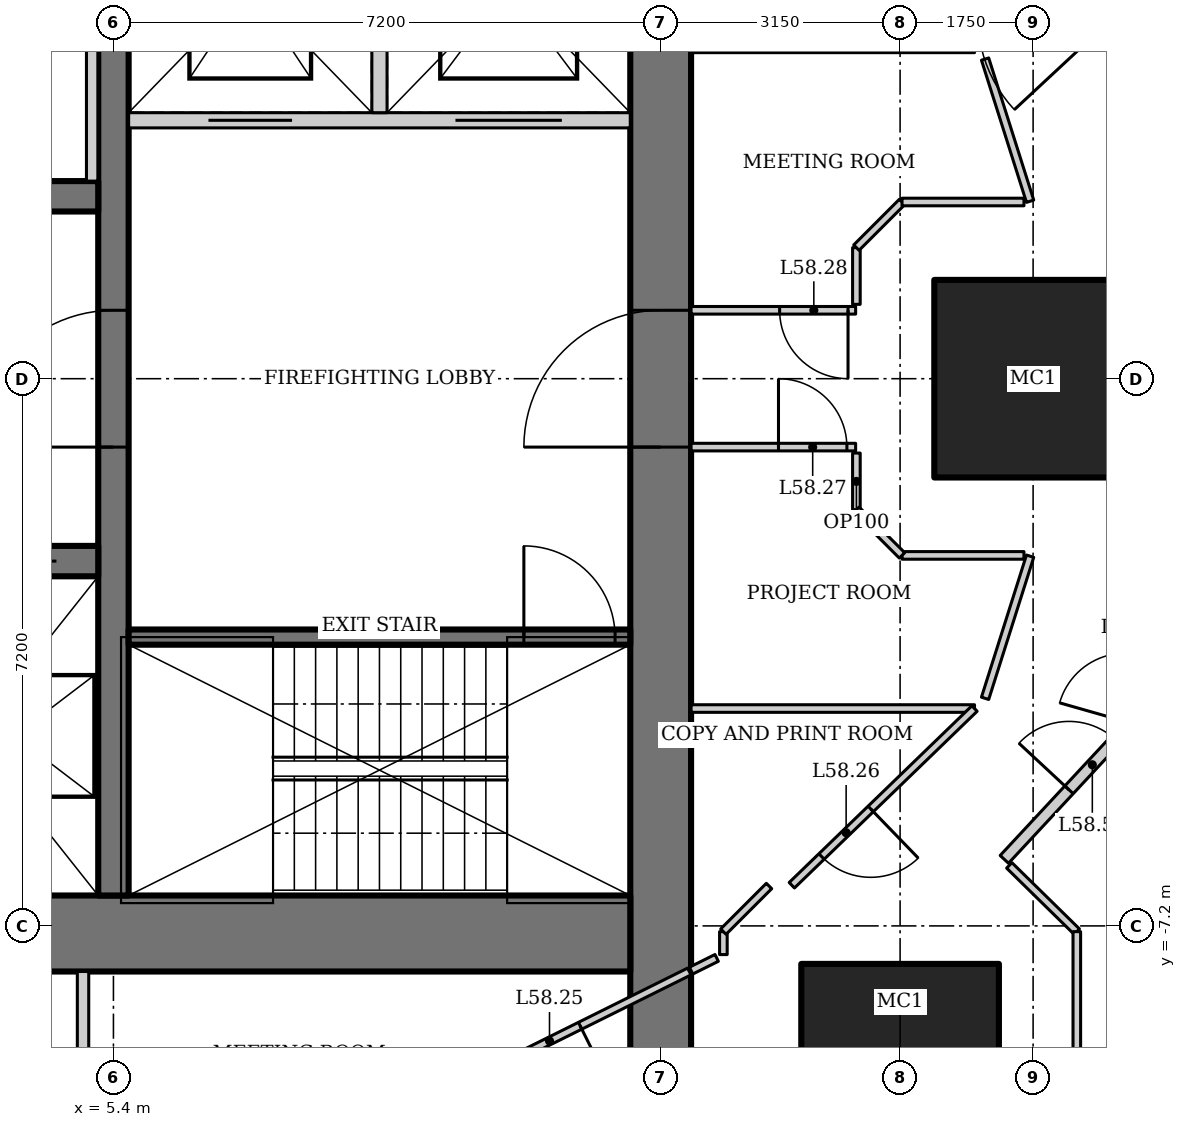
"""IFC4 building model, lengths in metres.
Left out: names, types, materials, properties, quantities, classifications, styles, units other than length and angle.
Written with IfcOpenShell. Run it as: python <this file> out.ifc"""

import sys

from ifc_helpers import new_model, si_unit, direction, frame, frame_2d, origin, origin_2d, place, context, subcontext, project, spatial, rectangle, hollow_rectangle, extrude, element, fill, save


model = new_model("IFC4")
c1 = context("Model", 3, precision=1e-05, world=origin(), true_north=direction((0.0, 1.0)))
c2 = subcontext(c1, "Body", "Model", "MODEL_VIEW")
j1 = project(units=[si_unit("LENGTHUNIT", "METRE"), si_unit("PLANEANGLEUNIT", "RADIAN")], contexts=[c1])
p1 = place(None, origin())
s1 = spatial("IfcSite", under=j1, at=p1, CompositionType="ELEMENT")
p2 = place(p1, origin())
s2 = spatial("IfcBuilding", under=s1, at=p2, CompositionType="ELEMENT")
p3 = place(p2, frame((0.0, 0.0, 249.4)))
s3 = spatial("IfcBuildingStorey", under=s2, at=p3, CompositionType="ELEMENT", Elevation=249.4)
for number, where, z_axis, x_axis in (
    (1, (17.5, 0.0, 0.0), (0.0, 0.0, 1.0), (1.0, 0.0, 0.0)),
    (2, (15.75, -9.0, 0.0), (0.0, 0.0, 1.0), (1.0, 0.0, 0.0)),
):
    element("IfcColumn", number, at=place(p3, frame(where, z_axis=z_axis, x_axis=x_axis)), inside=s3, PredefinedType="COLUMN", context=c2, shape_type="SweptSolid", body=[
        extrude(hollow_rectangle(XDim=2.6, YDim=2.6, WallThickness=0.13, at=origin_2d()), origin(), (0.0, 0.0, 1.0), 4.2),
    ])
p4 = place(p3, frame((12.6, -11.0, 0.0), z_axis=(0.0, 0.0, 1.0), x_axis=(0.0, 1.0, 0.0)))
e3 = element("IfcWall", 3, at=p4, inside=s3, PredefinedType="SHEAR", context=c2, shape_type="SweptSolid", body=[
    extrude(rectangle(XDim=22.0, YDim=0.8, at=frame_2d((11.0, 0.0))), origin(), (0.0, 0.0, 1.0), 4.2),
])
p5 = place(p4, frame((10.1, 0.0, 0.0)))
e4 = element("IfcOpeningElement", 4, at=p5, cuts=e3, PredefinedType="OPENING", context=c2, shape_type="SweptSolid", body=[
    extrude(rectangle(XDim=1.8, YDim=2.1, at=frame_2d((0.9, 1.05))), frame((0.0, 0.41, 0.0), z_axis=(0.0, -1.0, 0.0), x_axis=(1.0, 0.0, 0.0)), (0.0, 0.0, 1.0), 0.82),
])
p6 = place(p3, frame((-12.2, -7.3, 0.0), z_axis=(0.0, 0.0, 1.0), x_axis=(1.0, 0.0, 0.0)))
e5 = element("IfcWall", 5, at=p6, inside=s3, PredefinedType="SHEAR", context=c2, shape_type="SweptSolid", body=[
    extrude(rectangle(XDim=24.4, YDim=1.0, at=frame_2d((12.2, 0.0))), origin(), (0.0, 0.0, 1.0), 4.2),
])
p7 = place(p3, frame((5.4, -6.8, 0.0), z_axis=(0.0, 0.0, 1.0), x_axis=(0.0, 1.0, 0.0)))
e6 = element("IfcWall", 6, at=p7, inside=s3, PredefinedType="SHEAR", context=c2, shape_type="SweptSolid", body=[
    extrude(rectangle(XDim=14.6, YDim=0.4, at=frame_2d((7.3, 0.0))), origin(), (0.0, 0.0, 1.0), 4.2),
])
p8 = place(p7, frame((5.9, 0.0, 0.0)))
e7 = element("IfcOpeningElement", 7, at=p8, cuts=e6, PredefinedType="OPENING", context=c2, shape_type="SweptSolid", body=[
    extrude(rectangle(XDim=1.8, YDim=2.1, at=frame_2d((0.9, 1.05))), frame((0.0, 0.21, 0.0), z_axis=(0.0, -1.0, 0.0), x_axis=(1.0, 0.0, 0.0)), (0.0, 0.0, 1.0), 0.42),
])
p9 = place(p3, frame((-5.2, -2.4, 0.0), z_axis=(0.0, 0.0, 1.0), x_axis=(1.0, 0.0, 0.0)))
e8 = element("IfcWall", 8, at=p9, inside=s3, PredefinedType="SHEAR", context=c2, shape_type="SweptSolid", body=[
    extrude(rectangle(XDim=10.4, YDim=0.4, at=frame_2d((5.2, 0.0))), origin(), (0.0, 0.0, 1.0), 4.2),
])
p10 = place(p9, frame((1.683, 0.0, 0.0)))
e9 = element("IfcOpeningElement", 9, at=p10, cuts=e8, PredefinedType="OPENING", context=c2, shape_type="SweptSolid", body=[
    extrude(rectangle(XDim=1.1, YDim=2.2, at=frame_2d((0.55, 1.1))), frame((0.0, 0.21, 0.0), z_axis=(0.0, -1.0, 0.0), x_axis=(1.0, 0.0, 0.0)), (0.0, 0.0, 1.0), 0.42),
])
p11 = place(p9, frame((5.217, 0.0, 0.0)))
e10 = element("IfcOpeningElement", 10, at=p11, cuts=e8, PredefinedType="OPENING", context=c2, shape_type="SweptSolid", body=[
    extrude(rectangle(XDim=1.1, YDim=2.2, at=frame_2d((0.55, 1.1))), frame((0.0, 0.21, 0.0), z_axis=(0.0, -1.0, 0.0), x_axis=(1.0, 0.0, 0.0)), (0.0, 0.0, 1.0), 0.42),
])
p12 = place(p9, frame((8.75, 0.0, 0.0)))
e11 = element("IfcOpeningElement", 11, at=p12, cuts=e8, PredefinedType="OPENING", context=c2, shape_type="SweptSolid", body=[
    extrude(rectangle(XDim=1.1, YDim=2.2, at=frame_2d((0.55, 1.1))), frame((0.0, 0.21, 0.0), z_axis=(0.0, -1.0, 0.0), x_axis=(1.0, 0.0, 0.0)), (0.0, 0.0, 1.0), 0.42),
])
p13 = place(p3, frame((5.2, 2.4, 0.0), z_axis=(0.0, 0.0, 1.0), x_axis=(-1.0, 0.0, 0.0)))
e12 = element("IfcWall", 12, at=p13, inside=s3, PredefinedType="SHEAR", context=c2, shape_type="SweptSolid", body=[
    extrude(rectangle(XDim=10.4, YDim=0.4, at=frame_2d((5.2, 0.0))), origin(), (0.0, 0.0, 1.0), 4.2),
])
p14 = place(p3, frame((5.6, -3.4, 0.0), z_axis=(0.0, 0.0, 1.0), x_axis=(1.0, 0.0, 0.0)))
e13 = element("IfcWall", 13, at=p14, inside=s3, PredefinedType="SHEAR", context=c2, shape_type="SweptSolid", body=[
    extrude(rectangle(XDim=6.6, YDim=0.2, at=frame_2d((3.3, 0.0))), origin(), (0.0, 0.0, 1.0), 4.2),
])
p15 = place(p14, frame((5.2, 0.0, 0.0)))
e14 = element("IfcOpeningElement", 14, at=p15, cuts=e13, PredefinedType="OPENING", context=c2, shape_type="SweptSolid", body=[
    extrude(rectangle(XDim=1.2, YDim=2.1, at=frame_2d((0.6, 1.05))), frame((0.0, 0.11, 0.0), z_axis=(0.0, -1.0, 0.0), x_axis=(1.0, 0.0, 0.0)), (0.0, 0.0, 1.0), 0.22),
])
p16 = place(p3, frame((12.2, 3.4, 0.0), z_axis=(0.0, 0.0, 1.0), x_axis=(-1.0, 0.0, 0.0)))
e15 = element("IfcWall", 15, at=p16, inside=s3, PredefinedType="SOLIDWALL", context=c2, shape_type="SweptSolid", body=[
    extrude(rectangle(XDim=6.6, YDim=0.2, at=frame_2d((3.3, 0.0))), origin(), (0.0, 0.0, 1.0), 4.2),
])
p17 = place(p16, frame((4.45, 0.0, 0.0)))
e16 = element("IfcOpeningElement", 16, at=p17, cuts=e15, PredefinedType="OPENING", context=c2, shape_type="SweptSolid", body=[
    extrude(rectangle(XDim=1.1, YDim=2.2, at=frame_2d((0.55, 1.1))), frame((0.0, 0.11, 0.0), z_axis=(0.0, -1.0, 0.0), x_axis=(1.0, 0.0, 0.0)), (0.0, 0.0, 1.0), 0.22),
])
p18 = place(p16, frame((0.9, 0.0, 0.0)))
e17 = element("IfcOpeningElement", 17, at=p18, cuts=e15, PredefinedType="OPENING", context=c2, shape_type="SweptSolid", body=[
    extrude(rectangle(XDim=1.4, YDim=2.2, at=frame_2d((0.7, 1.1))), frame((0.0, 0.11, 0.0), z_axis=(0.0, -1.0, 0.0), x_axis=(1.0, 0.0, 0.0)), (0.0, 0.0, 1.0), 0.22),
])
p19 = place(p3, frame((8.9, 3.5, 0.0), z_axis=(0.0, 0.0, 1.0), x_axis=(0.0, 1.0, 0.0)))
e18 = element("IfcWall", 18, at=p19, inside=s3, PredefinedType="SOLIDWALL", context=c2, shape_type="SweptSolid", body=[
    extrude(rectangle(XDim=3.3, YDim=0.2, at=frame_2d((1.65, 0.0))), origin(), (0.0, 0.0, 1.0), 4.2),
])
p20 = place(p3, frame((5.12, 2.6, 0.0), z_axis=(0.0, 0.0, 1.0), x_axis=(0.0, 1.0, 0.0)))
e19 = element("IfcWall", 19, at=p20, inside=s3, PredefinedType="SOLIDWALL", context=c2, shape_type="SweptSolid", body=[
    extrude(rectangle(XDim=4.4, YDim=0.15, at=frame_2d((2.2, 0.0))), origin(), (0.0, 0.0, 1.0), 4.05),
])
p21 = place(p3, frame((5.0, -7.8, 0.0), z_axis=(0.0, 0.0, 1.0), x_axis=(0.0, -1.0, 0.0)))
e20 = element("IfcWall", 20, at=p21, inside=s3, PredefinedType="SOLIDWALL", context=c2, shape_type="SweptSolid", body=[
    extrude(rectangle(XDim=3.187, YDim=0.15, at=frame_2d((1.594, 0.0))), origin(), (0.0, 0.0, 1.0), 4.05),
])
p22 = place(p3, frame((12.977, -7.8, 0.0), z_axis=(0.0, 0.0, 1.0), x_axis=(-0.895529831139, -0.445001484874, 0.0)))
e21 = element("IfcWall", 21, at=p22, inside=s3, PredefinedType="PARTITIONING", context=c2, shape_type="SweptSolid", body=[
    extrude(rectangle(XDim=4.108, YDim=0.1, at=frame_2d((2.054, 0.0))), origin(), (0.0, 0.0, 1.0), 4.05),
])
p23 = place(p22, frame((1.604, 0.0, 0.0)))
e22 = element("IfcOpeningElement", 22, at=p23, cuts=e21, PredefinedType="OPENING", context=c2, shape_type="SweptSolid", body=[
    extrude(rectangle(XDim=0.9, YDim=2.1, at=frame_2d((0.45, 1.05))), frame((0.0, 0.06, 0.0), z_axis=(0.0, -1.0, 0.0), x_axis=(1.0, 0.0, 0.0)), (0.0, 0.0, 1.0), 0.12),
])
p24 = place(p3, frame((13.337, -7.621, 0.0), z_axis=(0.0, 0.0, 1.0), x_axis=(-0.895721570004, -0.444615416995, 0.0)))
e23 = element("IfcWall", 23, at=p24, inside=s3, PredefinedType="PARTITIONING", context=c2, shape_type="SweptSolid", body=[
    extrude(rectangle(XDim=0.376, YDim=0.1, at=frame_2d((0.188, 0.0))), origin(), (0.0, 0.0, 1.0), 4.05),
])
for number, where, z_axis, x_axis in (
    (24, (13.0, -4.34, 0.0), (0.0, 0.0, 1.0), (1.0, 0.0, 0.0)),
    (25, (13.0, 4.34, 0.0), (0.0, 0.0, 1.0), (1.0, 0.0, 0.0)),
):
    element("IfcWall", number, at=place(p3, frame(where, z_axis=z_axis, x_axis=x_axis)), inside=s3, PredefinedType="PARTITIONING", context=c2, shape_type="SweptSolid", body=[
        extrude(rectangle(XDim=3.729, YDim=0.1, at=frame_2d((1.865, 0.0))), origin(), (0.0, 0.0, 1.0), 4.05),
    ])
p25 = place(p3, frame((17.121, -6.325, 0.0), z_axis=(0.0, 0.0, 1.0), x_axis=(0.680985069419, 0.732297299755, 0.0)))
e26 = element("IfcWall", 26, at=p25, inside=s3, PredefinedType="PARTITIONING", context=c2, shape_type="SweptSolid", body=[
    extrude(rectangle(XDim=2.279, YDim=0.15, at=frame_2d((1.14, 0.0))), origin(), (0.0, 0.0, 1.0), 4.05),
])
p26 = place(p25, frame((1.25, 0.0, 0.0)))
e27 = element("IfcOpeningElement", 27, at=p26, cuts=e26, PredefinedType="OPENING", context=c2, shape_type="SweptSolid", body=[
    extrude(rectangle(XDim=0.9, YDim=2.1, at=frame_2d((0.45, 1.05))), frame((0.0, 0.085, 0.0), z_axis=(0.0, -1.0, 0.0), x_axis=(1.0, 0.0, 0.0)), (0.0, 0.0, 1.0), 0.17),
])
p27 = place(p3, frame((16.729, -4.34, 0.0), z_axis=(0.0, 0.0, 1.0), x_axis=(-0.718798647558, -0.695218314107, 0.0)))
e28 = element("IfcWall", 28, at=p27, inside=s3, PredefinedType="PARTITIONING", context=c2, shape_type="SweptSolid", body=[
    extrude(rectangle(XDim=3.344, YDim=0.1, at=frame_2d((1.672, 0.0))), origin(), (0.0, 0.0, 1.0), 4.05),
])
p28 = place(p27, frame((1.9, 0.0, 0.0)))
e29 = element("IfcOpeningElement", 29, at=p28, cuts=e28, PredefinedType="OPENING", context=c2, shape_type="SweptSolid", body=[
    extrude(rectangle(XDim=0.9, YDim=2.1, at=frame_2d((0.45, 1.05))), frame((0.0, 0.06, 0.0), z_axis=(0.0, -1.0, 0.0), x_axis=(1.0, 0.0, 0.0)), (0.0, 0.0, 1.0), 0.12),
])
p29 = place(p3, frame((13.425, -7.578, 0.0), z_axis=(0.0, 0.0, 1.0), x_axis=(0.0, 1.0, 0.0)))
e30 = element("IfcWall", 30, at=p29, inside=s3, PredefinedType="PARTITIONING", context=c2, shape_type="SweptSolid", body=[
    extrude(rectangle(XDim=0.302, YDim=0.1, at=frame_2d((0.151, 0.0))), origin(), (0.0, 0.0, 1.0), 4.05),
])
p30 = place(p3, frame((13.425, -7.275, 0.0), z_axis=(0.0, 0.0, 1.0), x_axis=(0.707106781187, 0.707106781187, 0.0)))
e31 = element("IfcWall", 31, at=p30, inside=s3, PredefinedType="PARTITIONING", context=c2, shape_type="SweptSolid", body=[
    extrude(rectangle(XDim=0.849, YDim=0.1, at=frame_2d((0.425, 0.0))), origin(), (0.0, 0.0, 1.0), 4.05),
])
p31 = place(p3, frame((17.187, -6.404, 0.0), z_axis=(0.0, 0.0, 1.0), x_axis=(0.713842064016, -0.700306723973, 0.0)))
e32 = element("IfcWall", 32, at=p31, inside=s3, PredefinedType="PARTITIONING", context=c2, shape_type="SweptSolid", body=[
    extrude(rectangle(XDim=1.245, YDim=0.1, at=frame_2d((0.622, 0.0))), origin(), (0.0, 0.0, 1.0), 4.05),
])
p32 = place(p3, frame((18.075, -7.275, 0.0), z_axis=(0.0, 0.0, 1.0), x_axis=(0.0, -1.0, 0.0)))
e33 = element("IfcWall", 33, at=p32, inside=s3, PredefinedType="PARTITIONING", context=c2, shape_type="SweptSolid", body=[
    extrude(rectangle(XDim=3.027, YDim=0.1, at=frame_2d((1.513, 0.0))), origin(), (0.0, 0.0, 1.0), 3.601),
])
p33 = place(p3, frame((17.46, -2.335, 0.0), z_axis=(0.0, 0.0, 1.0), x_axis=(-0.301821975729, -0.953364303384, 0.0)))
e34 = element("IfcWall", 34, at=p33, inside=s3, PredefinedType="PARTITIONING", context=c2, shape_type="SweptSolid", body=[
    extrude(rectangle(XDim=1.962, YDim=0.1, at=frame_2d((0.981, 0.0))), origin(), (0.0, 0.0, 1.0), 4.05),
])
p34 = place(p3, frame((13.0, -0.9, 0.0), z_axis=(0.0, 0.0, 1.0), x_axis=(1.0, 0.0, 0.0)))
e35 = element("IfcWall", 35, at=p34, inside=s3, PredefinedType="PARTITIONING", context=c2, shape_type="SweptSolid", body=[
    extrude(rectangle(XDim=2.165, YDim=0.1, at=frame_2d((1.083, 0.0))), origin(), (0.0, 0.0, 1.0), 4.05),
])
p35 = place(p34, frame((1.15, 0.0, 0.0)))
e36 = element("IfcOpeningElement", 36, at=p35, cuts=e35, PredefinedType="OPENING", context=c2, shape_type="SweptSolid", body=[
    extrude(rectangle(XDim=0.9, YDim=2.1, at=frame_2d((0.45, 1.05))), frame((0.0, 0.06, 0.0), z_axis=(0.0, -1.0, 0.0), x_axis=(1.0, 0.0, 0.0)), (0.0, 0.0, 1.0), 0.12),
])
p36 = place(p3, frame((16.868, 4.206, 0.0), z_axis=(0.0, 0.0, 1.0), x_axis=(0.301821975729, -0.953364303384, 0.0)))
e37 = element("IfcWall", 37, at=p36, inside=s3, PredefinedType="PARTITIONING", context=c2, shape_type="SweptSolid", body=[
    extrude(rectangle(XDim=1.962, YDim=0.1, at=frame_2d((0.981, 0.0))), origin(), (0.0, 0.0, 1.0), 4.05),
])
p37 = place(p3, frame((15.165, 0.9, 0.0), z_axis=(0.0, 0.0, 1.0), x_axis=(-1.0, 0.0, 0.0)))
e38 = element("IfcWall", 38, at=p37, inside=s3, PredefinedType="PARTITIONING", context=c2, shape_type="SweptSolid", body=[
    extrude(rectangle(XDim=2.165, YDim=0.1, at=frame_2d((1.083, 0.0))), origin(), (0.0, 0.0, 1.0), 4.05),
])
p38 = place(p37, frame((0.1, 0.0, 0.0)))
e39 = element("IfcOpeningElement", 39, at=p38, cuts=e38, PredefinedType="OPENING", context=c2, shape_type="SweptSolid", body=[
    extrude(rectangle(XDim=0.9, YDim=2.1, at=frame_2d((0.45, 1.05))), frame((0.0, 0.06, 0.0), z_axis=(0.0, -1.0, 0.0), x_axis=(1.0, 0.0, 0.0)), (0.0, 0.0, 1.0), 0.12),
])
p39 = place(p3, frame((15.175, -1.725, 0.0), z_axis=(0.0, 0.0, 1.0), x_axis=(0.0, 1.0, 0.0)))
e40 = element("IfcWall", 40, at=p39, inside=s3, PredefinedType="PARTITIONING", context=c2, shape_type="SweptSolid", body=[
    extrude(rectangle(XDim=0.746, YDim=0.1, at=frame_2d((0.373, 0.0))), origin(), (0.0, 0.0, 1.0), 4.05),
])
p40 = place(p3, frame((17.38, -2.325, 0.0), z_axis=(0.0, 0.0, 1.0), x_axis=(-1.0, 0.0, 0.0)))
e41 = element("IfcWall", 41, at=p40, inside=s3, PredefinedType="PARTITIONING", context=c2, shape_type="SweptSolid", body=[
    extrude(rectangle(XDim=1.604, YDim=0.1, at=frame_2d((0.802, 0.0))), origin(), (0.0, 0.0, 1.0), 4.05),
])
p41 = place(p3, frame((15.775, -2.325, 0.0), z_axis=(0.0, 0.0, 1.0), x_axis=(-0.707106781187, 0.707106781187, 0.0)))
e42 = element("IfcWall", 42, at=p41, inside=s3, PredefinedType="PARTITIONING", context=c2, shape_type="SweptSolid", body=[
    extrude(rectangle(XDim=0.849, YDim=0.1, at=frame_2d((0.425, 0.0))), origin(), (0.0, 0.0, 1.0), 4.05),
])
p42 = place(p3, frame((15.175, 0.978, 0.0), z_axis=(0.0, 0.0, 1.0), x_axis=(0.0, 1.0, 0.0)))
e43 = element("IfcWall", 43, at=p42, inside=s3, PredefinedType="PARTITIONING", context=c2, shape_type="SweptSolid", body=[
    extrude(rectangle(XDim=0.746, YDim=0.1, at=frame_2d((0.373, 0.0))), origin(), (0.0, 0.0, 1.0), 4.05),
])
p43 = place(p3, frame((15.175, 1.725, 0.0), z_axis=(0.0, 0.0, 1.0), x_axis=(0.707106781187, 0.707106781187, 0.0)))
e44 = element("IfcWall", 44, at=p43, inside=s3, PredefinedType="PARTITIONING", context=c2, shape_type="SweptSolid", body=[
    extrude(rectangle(XDim=0.849, YDim=0.1, at=frame_2d((0.425, 0.0))), origin(), (0.0, 0.0, 1.0), 4.05),
])
p44 = place(p3, frame((15.775, 2.325, 0.0), z_axis=(0.0, 0.0, 1.0), x_axis=(1.0, 0.0, 0.0)))
e45 = element("IfcWall", 45, at=p44, inside=s3, PredefinedType="PARTITIONING", context=c2, shape_type="SweptSolid", body=[
    extrude(rectangle(XDim=1.604, YDim=0.1, at=frame_2d((0.802, 0.0))), origin(), (0.0, 0.0, 1.0), 4.05),
])
p45 = place(p8, origin())
e46 = element("IfcDoor", 46, at=p45, inside=s3, OperationType="DOUBLE_DOOR_DOUBLE_SWING", PredefinedType="DOOR", context=c2, shape_type="SweptSolid", body=[
    extrude(rectangle(XDim=1.8, YDim=2.1, at=frame_2d((0.9, 1.05))), frame((0.0, 0.025, 0.0), z_axis=(0.0, -1.0, 0.0), x_axis=(1.0, 0.0, 0.0)), (0.0, 0.0, 1.0), 0.05),
])
fill(e7, e46)
p46 = place(p15, origin())
e47 = element("IfcDoor", 47, at=p46, inside=s3, OperationType="SINGLE_SWING_RIGHT", PredefinedType="DOOR", context=c2, shape_type="SweptSolid", body=[
    extrude(rectangle(XDim=1.2, YDim=2.1, at=frame_2d((0.6, 1.05))), frame((0.0, 0.025, 0.0), z_axis=(0.0, -1.0, 0.0), x_axis=(1.0, 0.0, 0.0)), (0.0, 0.0, 1.0), 0.05),
])
fill(e14, e47)
p47 = place(p5, origin())
e48 = element("IfcDoor", 48, at=p47, inside=s3, OperationType="DOUBLE_DOOR_DOUBLE_SWING", PredefinedType="DOOR", context=c2, shape_type="SweptSolid", body=[
    extrude(rectangle(XDim=1.8, YDim=2.1, at=frame_2d((0.9, 1.05))), frame((0.0, 0.025, 0.0), z_axis=(0.0, -1.0, 0.0), x_axis=(1.0, 0.0, 0.0)), (0.0, 0.0, 1.0), 0.05),
])
fill(e4, e48)
p48 = place(p12, origin())
e49 = element("IfcDoor", 49, at=p48, inside=s3, OperationType="DOUBLE_DOOR_SLIDING", PredefinedType="DOOR", context=c2, shape_type="SweptSolid", body=[
    extrude(rectangle(XDim=1.1, YDim=2.2, at=frame_2d((0.55, 1.1))), frame((0.0, 0.025, 0.0), z_axis=(0.0, -1.0, 0.0), x_axis=(1.0, 0.0, 0.0)), (0.0, 0.0, 1.0), 0.05),
])
fill(e11, e49)
p49 = place(p17, origin())
e50 = element("IfcDoor", 50, at=p49, inside=s3, OperationType="DOUBLE_DOOR_SLIDING", PredefinedType="DOOR", context=c2, shape_type="SweptSolid", body=[
    extrude(rectangle(XDim=1.1, YDim=2.2, at=frame_2d((0.55, 1.1))), frame((0.0, 0.025, 0.0), z_axis=(0.0, -1.0, 0.0), x_axis=(1.0, 0.0, 0.0)), (0.0, 0.0, 1.0), 0.05),
])
fill(e16, e50)
p50 = place(p18, origin())
e51 = element("IfcDoor", 51, at=p50, inside=s3, OperationType="DOUBLE_DOOR_SLIDING", PredefinedType="DOOR", context=c2, shape_type="SweptSolid", body=[
    extrude(rectangle(XDim=1.4, YDim=2.2, at=frame_2d((0.7, 1.1))), frame((0.0, 0.025, 0.0), z_axis=(0.0, -1.0, 0.0), x_axis=(1.0, 0.0, 0.0)), (0.0, 0.0, 1.0), 0.05),
])
fill(e17, e51)
p51 = place(p23, origin())
e52 = element("IfcDoor", 52, at=p51, inside=s3, OperationType="SINGLE_SWING_LEFT", PredefinedType="DOOR", context=c2, shape_type="SweptSolid", body=[
    extrude(rectangle(XDim=0.9, YDim=2.1, at=frame_2d((0.45, 1.05))), frame((0.0, 0.025, 0.0), z_axis=(0.0, -1.0, 0.0), x_axis=(1.0, 0.0, 0.0)), (0.0, 0.0, 1.0), 0.05),
])
fill(e22, e52)
p52 = place(p28, origin())
e53 = element("IfcDoor", 53, at=p52, inside=s3, OperationType="SINGLE_SWING_LEFT", PredefinedType="DOOR", context=c2, shape_type="SweptSolid", body=[
    extrude(rectangle(XDim=0.9, YDim=2.1, at=frame_2d((0.45, 1.05))), frame((0.0, 0.025, 0.0), z_axis=(0.0, -1.0, 0.0), x_axis=(1.0, 0.0, 0.0)), (0.0, 0.0, 1.0), 0.05),
])
fill(e29, e53)
p53 = place(p35, origin())
e54 = element("IfcDoor", 54, at=p53, inside=s3, OperationType="SINGLE_SWING_LEFT", PredefinedType="DOOR", context=c2, shape_type="SweptSolid", body=[
    extrude(rectangle(XDim=0.9, YDim=2.1, at=frame_2d((0.45, 1.05))), frame((0.0, 0.025, 0.0), z_axis=(0.0, -1.0, 0.0), x_axis=(1.0, 0.0, 0.0)), (0.0, 0.0, 1.0), 0.05),
])
fill(e36, e54)
p54 = place(p38, origin())
e55 = element("IfcDoor", 55, at=p54, inside=s3, OperationType="SINGLE_SWING_LEFT", PredefinedType="DOOR", context=c2, shape_type="SweptSolid", body=[
    extrude(rectangle(XDim=0.9, YDim=2.1, at=frame_2d((0.45, 1.05))), frame((0.0, 0.025, 0.0), z_axis=(0.0, -1.0, 0.0), x_axis=(1.0, 0.0, 0.0)), (0.0, 0.0, 1.0), 0.05),
])
fill(e39, e55)
p55 = place(p26, origin())
e56 = element("IfcDoor", 56, at=p55, inside=s3, OperationType="SINGLE_SWING_LEFT", PredefinedType="DOOR", context=c2, shape_type="SweptSolid", body=[
    extrude(rectangle(XDim=0.9, YDim=2.1, at=frame_2d((0.45, 1.05))), frame((0.0, 0.025, 0.0), z_axis=(0.0, -1.0, 0.0), x_axis=(1.0, 0.0, 0.0)), (0.0, 0.0, 1.0), 0.05),
])
fill(e27, e56)
save(model, sys.argv[1])
